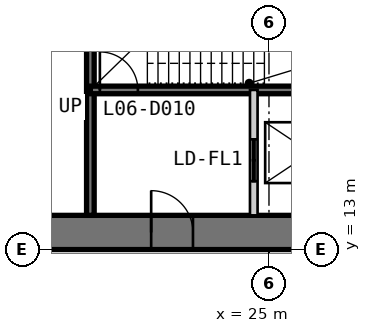
"""IFC4 building model, lengths in metres.
Left out: names, types, materials, properties, quantities, classifications, styles, units other than length and angle.
Written with IfcOpenShell. Run it as: python <this file> out.ifc"""

import sys

from ifc_helpers import new_model, si_unit, direction, frame, frame_2d, origin, place, context, subcontext, project, spatial, polyline, rectangle, outline, extrude, element, fill, save


model = new_model("IFC4")
c1 = context("Model", 3, precision=1e-05, world=origin(), true_north=direction((0.0, 1.0)))
c2 = subcontext(c1, "Body", "Model", "MODEL_VIEW")
j1 = project(units=[si_unit("LENGTHUNIT", "METRE"), si_unit("PLANEANGLEUNIT", "RADIAN")], contexts=[c1])
p1 = place(None, origin())
s1 = spatial("IfcSite", under=j1, at=p1, CompositionType="ELEMENT")
p2 = place(p1, origin())
s2 = spatial("IfcBuilding", under=s1, at=p2, CompositionType="ELEMENT")
p3 = place(p2, frame((0.0, 0.0, 31.0)))
s3 = spatial("IfcBuildingStorey", under=s2, at=p3, CompositionType="ELEMENT", Elevation=31.0)
p4 = place(p3, frame((13.0, 13.45, 0.0), z_axis=(0.0, 0.0, 1.0), x_axis=(1.0, 0.0, 0.0)))
e1 = element("IfcWall", 1, at=p4, inside=s3, PredefinedType="SHEAR", context=c2, shape_type="SweptSolid", body=[
    extrude(outline(polyline([(0.0, -0.45), (24.0, -0.45), (23.1, 0.45), (0.9, 0.45), (0.0, -0.45)])), origin(), (0.0, 0.0, 1.0), 4.0),
])
p5 = place(p4, frame((4.9, 0.0, 0.0)))
e2 = element("IfcOpeningElement", 2, at=p5, cuts=e1, PredefinedType="OPENING", context=c2, shape_type="SweptSolid", body=[
    extrude(rectangle(XDim=1.0, YDim=2.2, at=frame_2d((0.5, 1.1))), frame((0.0, 0.46, 0.0), z_axis=(0.0, -1.0, 0.0), x_axis=(1.0, 0.0, 0.0)), (0.0, 0.0, 1.0), 0.92),
])
p6 = place(p4, frame((8.9, 0.0, 0.0)))
e3 = element("IfcOpeningElement", 3, at=p6, cuts=e1, PredefinedType="OPENING", context=c2, shape_type="SweptSolid", body=[
    extrude(rectangle(XDim=1.1, YDim=2.2, at=frame_2d((0.55, 1.1))), frame((0.0, 0.46, 0.0), z_axis=(0.0, -1.0, 0.0), x_axis=(1.0, 0.0, 0.0)), (0.0, 0.0, 1.0), 0.92),
])
p7 = place(p4, frame((15.05, 0.0, 0.0)))
e4 = element("IfcOpeningElement", 4, at=p7, cuts=e1, PredefinedType="OPENING", context=c2, shape_type="SweptSolid", body=[
    extrude(rectangle(XDim=0.9, YDim=2.2, at=frame_2d((0.45, 1.1))), frame((0.0, 0.46, 0.0), z_axis=(0.0, -1.0, 0.0), x_axis=(1.0, 0.0, 0.0)), (0.0, 0.0, 1.0), 0.92),
])
p8 = place(p4, frame((17.9, 0.0, 0.0)))
e5 = element("IfcOpeningElement", 5, at=p8, cuts=e1, PredefinedType="OPENING", context=c2, shape_type="SweptSolid", body=[
    extrude(rectangle(XDim=1.0, YDim=2.2, at=frame_2d((0.5, 1.1))), frame((0.0, 0.46, 0.0), z_axis=(0.0, -1.0, 0.0), x_axis=(1.0, 0.0, 0.0)), (0.0, 0.0, 1.0), 0.92),
])
p9 = place(p4, frame((21.4, 0.0, 0.0)))
e6 = element("IfcOpeningElement", 6, at=p9, cuts=e1, PredefinedType="OPENING", context=c2, shape_type="SweptSolid", body=[
    extrude(rectangle(XDim=1.0, YDim=2.2, at=frame_2d((0.5, 1.1))), frame((0.0, 0.46, 0.0), z_axis=(0.0, -1.0, 0.0), x_axis=(1.0, 0.0, 0.0)), (0.0, 0.0, 1.0), 0.92),
])
p10 = place(p3, frame((20.3, 13.9, 0.0), z_axis=(0.0, 0.0, 1.0), x_axis=(0.0, 1.0, 0.0)))
e7 = element("IfcWall", 7, at=p10, inside=s3, PredefinedType="SOLIDWALL", context=c2, shape_type="SweptSolid", body=[
    extrude(rectangle(XDim=16.1, YDim=0.2, at=frame_2d((8.05, 0.0))), origin(), (0.0, 0.0, 1.0), 3.8),
])
p11 = place(p3, frame((20.3, 17.2, 0.0), z_axis=(0.0, 0.0, 1.0), x_axis=(1.0, 0.0, 0.0)))
e8 = element("IfcWall", 8, at=p11, inside=s3, PredefinedType="SOLIDWALL", context=c2, shape_type="SweptSolid", body=[
    extrude(rectangle(XDim=9.4, YDim=0.2, at=frame_2d((4.7, 0.0))), origin(), (0.0, 0.0, 1.0), 3.8),
])
p12 = place(p11, frame((0.25, 0.0, 0.0)))
e9 = element("IfcOpeningElement", 9, at=p12, cuts=e8, PredefinedType="OPENING", context=c2, shape_type="SweptSolid", body=[
    extrude(rectangle(XDim=1.0, YDim=2.2, at=frame_2d((0.5, 1.1))), frame((0.0, 0.11, 0.0), z_axis=(0.0, -1.0, 0.0), x_axis=(1.0, 0.0, 0.0)), (0.0, 0.0, 1.0), 0.22),
])
p13 = place(p3, frame((24.6, 13.9, 0.0), z_axis=(0.0, 0.0, 1.0), x_axis=(0.0, 1.0, 0.0)))
e10 = element("IfcWall", 10, at=p13, inside=s3, PredefinedType="PARTITIONING", context=c2, shape_type="SweptSolid", body=[
    extrude(rectangle(XDim=3.3, YDim=0.2, at=frame_2d((1.65, 0.0))), origin(), (0.0, 0.0, 1.0), 3.8),
])
p14 = place(p13, frame((0.9, 0.0, 0.0)))
e11 = element("IfcOpeningElement", 11, at=p14, cuts=e10, PredefinedType="OPENING", context=c2, shape_type="SweptSolid", body=[
    extrude(rectangle(XDim=1.1, YDim=2.2, at=frame_2d((0.55, 1.1))), frame((0.0, 0.11, 0.0), z_axis=(0.0, -1.0, 0.0), x_axis=(1.0, 0.0, 0.0)), (0.0, 0.0, 1.0), 0.22),
])
p15 = place(p6, origin())
e12 = element("IfcDoor", 12, at=p15, inside=s3, OperationType="SINGLE_SWING_LEFT", PredefinedType="DOOR", context=c2, shape_type="SweptSolid", body=[
    extrude(rectangle(XDim=1.1, YDim=2.2, at=frame_2d((0.55, 1.1))), frame((0.0, 0.025, 0.0), z_axis=(0.0, -1.0, 0.0), x_axis=(1.0, 0.0, 0.0)), (0.0, 0.0, 1.0), 0.05),
    extrude(outline(polyline([(0.0, 0.0), (0.04, 0.0), (0.04, 2.16), (1.06, 2.16), (1.06, 0.0), (1.1, 0.0), (1.1, 2.2), (0.0, 2.2), (0.0, 0.0)])), frame((0.0, 0.3, 0.0), z_axis=(0.0, -1.0, 0.0), x_axis=(1.0, 0.0, 0.0)), (0.0, 0.0, 1.0), 0.6),
])
fill(e3, e12)
p16 = place(p12, origin())
e13 = element("IfcDoor", 13, at=p16, inside=s3, OperationType="SINGLE_SWING_LEFT", PredefinedType="DOOR", context=c2, shape_type="SweptSolid", body=[
    extrude(rectangle(XDim=1.0, YDim=2.2, at=frame_2d((0.5, 1.1))), frame((0.0, 0.025, 0.0), z_axis=(0.0, -1.0, 0.0), x_axis=(1.0, 0.0, 0.0)), (0.0, 0.0, 1.0), 0.05),
])
fill(e9, e13)
p17 = place(p14, origin())
e14 = element("IfcDoor", 14, at=p17, inside=s3, OperationType="DOUBLE_DOOR_SLIDING", PredefinedType="DOOR", context=c2, shape_type="SweptSolid", body=[
    extrude(rectangle(XDim=1.1, YDim=2.2, at=frame_2d((0.55, 1.1))), frame((0.0, 0.025, 0.0), z_axis=(0.0, -1.0, 0.0), x_axis=(1.0, 0.0, 0.0)), (0.0, 0.0, 1.0), 0.05),
])
fill(e11, e14)
save(model, sys.argv[1])
